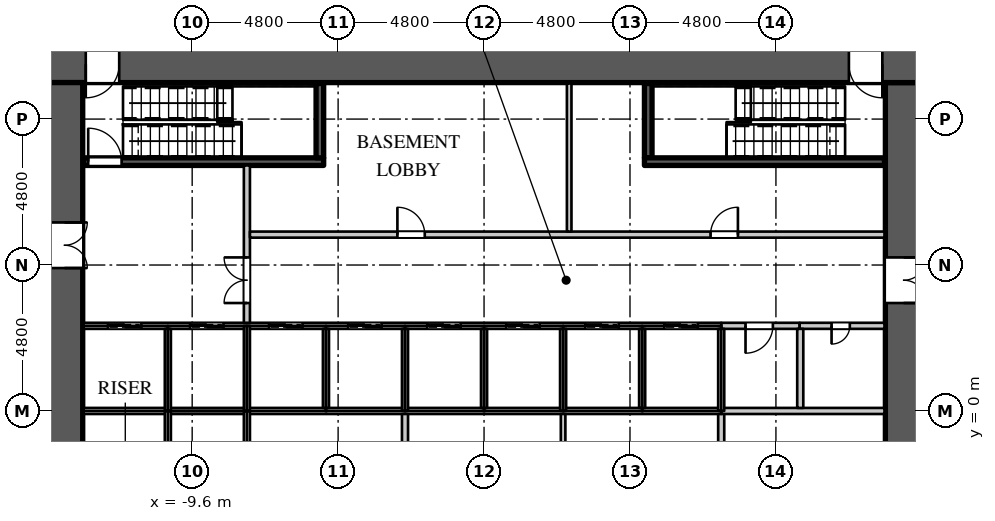
"""IFC4 building model, lengths in metres.
Left out: names, types, materials, properties, quantities, classifications, styles, units other than length and angle.
Written with IfcOpenShell. Run it as: python <this file> out.ifc"""

import sys

from ifc_helpers import new_model, si_unit, direction, frame, frame_2d, origin, place, context, subcontext, project, spatial, rectangle, extrude, element, fill, save


model = new_model("IFC4")
c1 = context("Model", 3, precision=1e-05, world=origin(), true_north=direction((0.0, 1.0)))
c2 = subcontext(c1, "Body", "Model", "MODEL_VIEW")
j1 = project(units=[si_unit("LENGTHUNIT", "METRE"), si_unit("PLANEANGLEUNIT", "RADIAN")], contexts=[c1])
p1 = place(None, origin())
s1 = spatial("IfcSite", under=j1, at=p1, CompositionType="ELEMENT")
p2 = place(p1, origin())
s2 = spatial("IfcBuilding", under=s1, at=p2, CompositionType="ELEMENT")
p3 = place(p2, frame((0.0, 0.0, -4.5)))
s3 = spatial("IfcBuildingStorey", under=s2, at=p3, CompositionType="ELEMENT", Elevation=-4.5)
p4 = place(p3, frame((-14.4, 11.4, 0.0), z_axis=(0.0, 0.0, 1.0), x_axis=(1.0, 0.0, 0.0)))
e1 = element("IfcWall", 1, at=p4, inside=s3, PredefinedType="SHEAR", context=c2, shape_type="SweptSolid", body=[
    extrude(rectangle(XDim=28.8, YDim=1.2, at=frame_2d((14.4, 0.0))), origin(), (0.0, 0.0, 1.0), 4.5),
])
p5 = place(p4, frame((1.3, 0.0, 0.0)))
e2 = element("IfcOpeningElement", 2, at=p5, cuts=e1, PredefinedType="OPENING", context=c2, shape_type="SweptSolid", body=[
    extrude(rectangle(XDim=1.1, YDim=2.2, at=frame_2d((0.55, 1.1))), frame((0.0, 0.61, 0.0), z_axis=(0.0, -1.0, 0.0), x_axis=(1.0, 0.0, 0.0)), (0.0, 0.0, 1.0), 1.22),
])
p6 = place(p4, frame((26.4, 0.0, 0.0)))
e3 = element("IfcOpeningElement", 3, at=p6, cuts=e1, PredefinedType="OPENING", context=c2, shape_type="SweptSolid", body=[
    extrude(rectangle(XDim=1.1, YDim=2.2, at=frame_2d((0.55, 1.1))), frame((0.0, 0.61, 0.0), z_axis=(0.0, -1.0, 0.0), x_axis=(1.0, 0.0, 0.0)), (0.0, 0.0, 1.0), 1.22),
])
p7 = place(p3, frame((13.8, -10.8, 0.0), z_axis=(0.0, 0.0, 1.0), x_axis=(0.0, 1.0, 0.0)))
e4 = element("IfcWall", 4, at=p7, inside=s3, PredefinedType="SHEAR", context=c2, shape_type="SweptSolid", body=[
    extrude(rectangle(XDim=21.6, YDim=1.2, at=frame_2d((10.8, 0.0))), origin(), (0.0, 0.0, 1.0), 4.5),
])
p8 = place(p7, frame((14.35, 0.0, 0.0)))
e5 = element("IfcOpeningElement", 5, at=p8, cuts=e4, PredefinedType="OPENING", context=c2, shape_type="SweptSolid", body=[
    extrude(rectangle(XDim=1.5, YDim=2.4, at=frame_2d((0.75, 1.2))), frame((0.0, 0.61, 0.0), z_axis=(0.0, -1.0, 0.0), x_axis=(1.0, 0.0, 0.0)), (0.0, 0.0, 1.0), 1.22),
])
p9 = place(p3, frame((-13.8, -10.8, 0.0), z_axis=(0.0, 0.0, 1.0), x_axis=(0.0, 1.0, 0.0)))
e6 = element("IfcWall", 6, at=p9, inside=s3, PredefinedType="SHEAR", context=c2, shape_type="SweptSolid", body=[
    extrude(rectangle(XDim=21.6, YDim=1.2, at=frame_2d((10.8, 0.0))), origin(), (0.0, 0.0, 1.0), 4.5),
])
p10 = place(p9, frame((15.5, 0.0, 0.0)))
e7 = element("IfcOpeningElement", 7, at=p10, cuts=e6, PredefinedType="OPENING", context=c2, shape_type="SweptSolid", body=[
    extrude(rectangle(XDim=1.5, YDim=2.4, at=frame_2d((0.75, 1.2))), frame((0.0, 0.61, 0.0), z_axis=(0.0, -1.0, 0.0), x_axis=(1.0, 0.0, 0.0)), (0.0, 0.0, 1.0), 1.22),
])
p11 = place(p9, frame((4.5, 0.0, 0.0)))
e8 = element("IfcOpeningElement", 8, at=p11, cuts=e6, PredefinedType="OPENING", context=c2, shape_type="SweptSolid", body=[
    extrude(rectangle(XDim=1.5, YDim=2.4, at=frame_2d((0.75, 1.2))), frame((0.0, 0.61, 0.0), z_axis=(0.0, -1.0, 0.0), x_axis=(1.0, 0.0, 0.0)), (0.0, 0.0, 1.0), 1.22),
])
p12 = place(p3, frame((-7.8, 2.8, 0.0), z_axis=(0.0, 0.0, 1.0), x_axis=(0.0, 1.0, 0.0)))
e9 = element("IfcWall", 9, at=p12, inside=s3, PredefinedType="PARTITIONING", context=c2, shape_type="SweptSolid", body=[
    extrude(rectangle(XDim=5.275, YDim=0.2, at=frame_2d((2.637, 0.0))), origin(), (0.0, 0.0, 1.0), 4.048),
])
p13 = place(p12, frame((0.75, 0.0, 0.0)))
e10 = element("IfcOpeningElement", 10, at=p13, cuts=e9, PredefinedType="OPENING", context=c2, shape_type="SweptSolid", body=[
    extrude(rectangle(XDim=1.5, YDim=2.4, at=frame_2d((0.75, 1.2))), frame((0.0, 0.11, 0.0), z_axis=(0.0, -1.0, 0.0), x_axis=(1.0, 0.0, 0.0)), (0.0, 0.0, 1.0), 0.22),
])
p14 = place(p3, frame((-7.7, 5.8, 0.0), z_axis=(0.0, 0.0, 1.0), x_axis=(1.0, 0.0, 0.0)))
e11 = element("IfcWall", 11, at=p14, inside=s3, PredefinedType="PARTITIONING", context=c2, shape_type="SweptSolid", body=[
    extrude(rectangle(XDim=20.87, YDim=0.2, at=frame_2d((10.435, 0.0))), origin(), (0.0, 0.0, 1.0), 4.048),
])
p15 = place(p14, frame((4.85, 0.0, 0.0)))
e12 = element("IfcOpeningElement", 12, at=p15, cuts=e11, PredefinedType="OPENING", context=c2, shape_type="SweptSolid", body=[
    extrude(rectangle(XDim=0.9, YDim=2.2, at=frame_2d((0.45, 1.1))), frame((0.0, 0.11, 0.0), z_axis=(0.0, -1.0, 0.0), x_axis=(1.0, 0.0, 0.0)), (0.0, 0.0, 1.0), 0.22),
])
p16 = place(p14, frame((15.15, 0.0, 0.0)))
e13 = element("IfcOpeningElement", 13, at=p16, cuts=e11, PredefinedType="OPENING", context=c2, shape_type="SweptSolid", body=[
    extrude(rectangle(XDim=0.9, YDim=2.2, at=frame_2d((0.45, 1.1))), frame((0.0, 0.11, 0.0), z_axis=(0.0, -1.0, 0.0), x_axis=(1.0, 0.0, 0.0)), (0.0, 0.0, 1.0), 0.22),
])
p17 = place(p3, frame((7.8, 2.8, 0.0), z_axis=(0.0, 0.0, 1.0), x_axis=(1.0, 0.0, 0.0)))
e14 = element("IfcWall", 14, at=p17, inside=s3, PredefinedType="PARTITIONING", context=c2, shape_type="SweptSolid", body=[
    extrude(rectangle(XDim=2.58, YDim=0.2, at=frame_2d((1.29, 0.0))), origin(), (0.0, 0.0, 1.0), 4.048),
])
p18 = place(p17, frame((0.8, 0.0, 0.0)))
e15 = element("IfcOpeningElement", 15, at=p18, cuts=e14, PredefinedType="OPENING", context=c2, shape_type="SweptSolid", body=[
    extrude(rectangle(XDim=0.9, YDim=2.2, at=frame_2d((0.45, 1.1))), frame((0.0, 0.11, 0.0), z_axis=(0.0, -1.0, 0.0), x_axis=(1.0, 0.0, 0.0)), (0.0, 0.0, 1.0), 0.22),
])
p19 = place(p3, frame((2.6, -2.7, 0.0), z_axis=(0.0, 0.0, 1.0), x_axis=(0.0, 1.0, 0.0)))
e16 = element("IfcWall", 16, at=p19, inside=s3, PredefinedType="PARTITIONING", context=c2, shape_type="SweptSolid", body=[
    extrude(rectangle(XDim=2.7, YDim=0.15, at=frame_2d((1.35, 0.0))), origin(), (0.0, 0.0, 1.0), 4.048),
])
p20 = place(p3, frame((2.8, 5.9, 0.0), z_axis=(0.0, 0.0, 1.0), x_axis=(0.0, 1.0, 0.0)))
e17 = element("IfcWall", 17, at=p20, inside=s3, PredefinedType="PARTITIONING", context=c2, shape_type="SweptSolid", body=[
    extrude(rectangle(XDim=4.87, YDim=0.15, at=frame_2d((2.435, 0.0))), origin(), (0.0, 0.0, 1.0), 4.048),
])
for number, where, z_axis, x_axis in (
    (18, (-2.6, -2.7, 0.0), (0.0, 0.0, 1.0), (0.0, 1.0, 0.0)),
    (19, (7.8, -2.7, 0.0), (0.0, 0.0, 1.0), (0.0, 1.0, 0.0)),
):
    element("IfcWall", number, at=place(p3, frame(where, z_axis=z_axis, x_axis=x_axis)), inside=s3, PredefinedType="PARTITIONING", context=c2, shape_type="SweptSolid", body=[
        extrude(rectangle(XDim=2.7, YDim=0.2, at=frame_2d((1.35, 0.0))), origin(), (0.0, 0.0, 1.0), 4.048),
    ])
p21 = place(p3, frame((7.8, 0.0, 0.0), z_axis=(0.0, 0.0, 1.0), x_axis=(1.0, 0.0, 0.0)))
e20 = element("IfcWall", 20, at=p21, inside=s3, PredefinedType="PARTITIONING", context=c2, shape_type="SweptSolid", body=[
    extrude(rectangle(XDim=5.37, YDim=0.2, at=frame_2d((2.685, 0.0))), origin(), (0.0, 0.0, 1.0), 4.048),
])
p22 = place(p3, frame((10.38, 2.8, 0.0), z_axis=(0.0, 0.0, 1.0), x_axis=(1.0, 0.0, 0.0)))
e21 = element("IfcWall", 21, at=p22, inside=s3, PredefinedType="PARTITIONING", context=c2, shape_type="SweptSolid", body=[
    extrude(rectangle(XDim=2.79, YDim=0.2, at=frame_2d((1.395, 0.0))), origin(), (0.0, 0.0, 1.0), 4.048),
])
p23 = place(p22, frame((1.05, 0.0, 0.0)))
e22 = element("IfcOpeningElement", 22, at=p23, cuts=e21, PredefinedType="OPENING", context=c2, shape_type="SweptSolid", body=[
    extrude(rectangle(XDim=0.6, YDim=2.0, at=frame_2d((0.3, 1.0))), frame((0.0, 0.11, 0.0), z_axis=(0.0, -1.0, 0.0), x_axis=(1.0, 0.0, 0.0)), (0.0, 0.0, 1.0), 0.22),
])
p24 = place(p3, frame((10.4, 0.1, 0.0), z_axis=(0.0, 0.0, 1.0), x_axis=(0.0, 1.0, 0.0)))
e23 = element("IfcWall", 23, at=p24, inside=s3, PredefinedType="PARTITIONING", context=c2, shape_type="SweptSolid", body=[
    extrude(rectangle(XDim=2.6, YDim=0.2, at=frame_2d((1.3, 0.0))), origin(), (0.0, 0.0, 1.0), 4.048),
])
p25 = place(p3, frame((-13.17, 0.0, 0.0), z_axis=(0.0, 0.0, 1.0), x_axis=(1.0, 0.0, 0.0)))
e24 = element("IfcWall", 24, at=p25, inside=s3, PredefinedType="PARTITIONING", context=c2, shape_type="SweptSolid", body=[
    extrude(rectangle(XDim=20.97, YDim=0.2, at=frame_2d((10.485, 0.0))), origin(), (0.0, 0.0, 1.0), 4.048),
])
p26 = place(p3, frame((-13.17, 2.8, 0.0), z_axis=(0.0, 0.0, 1.0), x_axis=(1.0, 0.0, 0.0)))
e25 = element("IfcWall", 25, at=p26, inside=s3, PredefinedType="PARTITIONING", context=c2, shape_type="SweptSolid", body=[
    extrude(rectangle(XDim=20.97, YDim=0.2, at=frame_2d((10.485, 0.0))), origin(), (0.0, 0.0, 1.0), 4.048),
])
p27 = place(p26, frame((0.8, 0.0, 0.0)))
e26 = element("IfcOpeningElement", 26, at=p27, cuts=e25, PredefinedType="OPENING", context=c2, shape_type="SweptSolid", body=[
    extrude(rectangle(XDim=1.1, YDim=2.2, at=frame_2d((0.55, 1.1))), frame((0.0, 0.11, 0.0), z_axis=(0.0, -1.0, 0.0), x_axis=(1.0, 0.0, 0.0)), (0.0, 0.0, 1.0), 0.22),
])
p28 = place(p26, frame((3.5, 0.0, 0.0)))
e27 = element("IfcOpeningElement", 27, at=p28, cuts=e25, PredefinedType="OPENING", context=c2, shape_type="SweptSolid", body=[
    extrude(rectangle(XDim=1.1, YDim=2.2, at=frame_2d((0.55, 1.1))), frame((0.0, 0.11, 0.0), z_axis=(0.0, -1.0, 0.0), x_axis=(1.0, 0.0, 0.0)), (0.0, 0.0, 1.0), 0.22),
])
p29 = place(p26, frame((6.1, 0.0, 0.0)))
e28 = element("IfcOpeningElement", 28, at=p29, cuts=e25, PredefinedType="OPENING", context=c2, shape_type="SweptSolid", body=[
    extrude(rectangle(XDim=1.1, YDim=2.2, at=frame_2d((0.55, 1.1))), frame((0.0, 0.11, 0.0), z_axis=(0.0, -1.0, 0.0), x_axis=(1.0, 0.0, 0.0)), (0.0, 0.0, 1.0), 0.22),
])
p30 = place(p26, frame((8.7, 0.0, 0.0)))
e29 = element("IfcOpeningElement", 29, at=p30, cuts=e25, PredefinedType="OPENING", context=c2, shape_type="SweptSolid", body=[
    extrude(rectangle(XDim=1.1, YDim=2.2, at=frame_2d((0.55, 1.1))), frame((0.0, 0.11, 0.0), z_axis=(0.0, -1.0, 0.0), x_axis=(1.0, 0.0, 0.0)), (0.0, 0.0, 1.0), 0.22),
])
p31 = place(p26, frame((11.3, 0.0, 0.0)))
e30 = element("IfcOpeningElement", 30, at=p31, cuts=e25, PredefinedType="OPENING", context=c2, shape_type="SweptSolid", body=[
    extrude(rectangle(XDim=1.1, YDim=2.2, at=frame_2d((0.55, 1.1))), frame((0.0, 0.11, 0.0), z_axis=(0.0, -1.0, 0.0), x_axis=(1.0, 0.0, 0.0)), (0.0, 0.0, 1.0), 0.22),
])
p32 = place(p26, frame((13.9, 0.0, 0.0)))
e31 = element("IfcOpeningElement", 31, at=p32, cuts=e25, PredefinedType="OPENING", context=c2, shape_type="SweptSolid", body=[
    extrude(rectangle(XDim=1.1, YDim=2.2, at=frame_2d((0.55, 1.1))), frame((0.0, 0.11, 0.0), z_axis=(0.0, -1.0, 0.0), x_axis=(1.0, 0.0, 0.0)), (0.0, 0.0, 1.0), 0.22),
])
p33 = place(p26, frame((16.5, 0.0, 0.0)))
e32 = element("IfcOpeningElement", 32, at=p33, cuts=e25, PredefinedType="OPENING", context=c2, shape_type="SweptSolid", body=[
    extrude(rectangle(XDim=1.1, YDim=2.2, at=frame_2d((0.55, 1.1))), frame((0.0, 0.11, 0.0), z_axis=(0.0, -1.0, 0.0), x_axis=(1.0, 0.0, 0.0)), (0.0, 0.0, 1.0), 0.22),
])
p34 = place(p26, frame((19.1, 0.0, 0.0)))
e33 = element("IfcOpeningElement", 33, at=p34, cuts=e25, PredefinedType="OPENING", context=c2, shape_type="SweptSolid", body=[
    extrude(rectangle(XDim=1.1, YDim=2.2, at=frame_2d((0.55, 1.1))), frame((0.0, 0.11, 0.0), z_axis=(0.0, -1.0, 0.0), x_axis=(1.0, 0.0, 0.0)), (0.0, 0.0, 1.0), 0.22),
])
for number, where, z_axis, x_axis in (
    (34, (-10.4, -2.7, 0.0), (0.0, 0.0, 1.0), (0.0, 1.0, 0.0)),
    (35, (-10.4, 0.0, 0.0), (0.0, 0.0, 1.0), (0.0, 1.0, 0.0)),
):
    element("IfcWall", number, at=place(p3, frame(where, z_axis=z_axis, x_axis=x_axis)), inside=s3, PredefinedType="PARTITIONING", context=c2, shape_type="SweptSolid", body=[
        extrude(rectangle(XDim=2.7, YDim=0.2, at=frame_2d((1.35, 0.0))), origin(), (0.0, 0.0, 1.0), 4.048),
    ])
for number, where, z_axis, x_axis in (
    (36, (-7.8, -2.8, 0.0), (0.0, 0.0, 1.0), (0.0, 1.0, 0.0)),
    (37, (-7.8, 0.0, 0.0), (0.0, 0.0, 1.0), (0.0, 1.0, 0.0)),
):
    element("IfcWall", number, at=place(p3, frame(where, z_axis=z_axis, x_axis=x_axis)), inside=s3, PredefinedType="PARTITIONING", context=c2, shape_type="SweptSolid", body=[
        extrude(rectangle(XDim=2.8, YDim=0.2, at=frame_2d((1.4, 0.0))), origin(), (0.0, 0.0, 1.0), 4.048),
    ])
p35 = place(p3, frame((-5.2, 0.1, 0.0), z_axis=(0.0, 0.0, 1.0), x_axis=(0.0, 1.0, 0.0)))
e38 = element("IfcWall", 38, at=p35, inside=s3, PredefinedType="PARTITIONING", context=c2, shape_type="SweptSolid", body=[
    extrude(rectangle(XDim=2.6, YDim=0.2, at=frame_2d((1.3, 0.0))), origin(), (0.0, 0.0, 1.0), 4.048),
])
p36 = place(p3, frame((-2.6, 0.0, 0.0), z_axis=(0.0, 0.0, 1.0), x_axis=(0.0, 1.0, 0.0)))
e39 = element("IfcWall", 39, at=p36, inside=s3, PredefinedType="PARTITIONING", context=c2, shape_type="SweptSolid", body=[
    extrude(rectangle(XDim=2.7, YDim=0.2, at=frame_2d((1.35, 0.0))), origin(), (0.0, 0.0, 1.0), 4.048),
])
p37 = place(p3, frame((0.0, 0.1, 0.0), z_axis=(0.0, 0.0, 1.0), x_axis=(0.0, 1.0, 0.0)))
e40 = element("IfcWall", 40, at=p37, inside=s3, PredefinedType="PARTITIONING", context=c2, shape_type="SweptSolid", body=[
    extrude(rectangle(XDim=2.6, YDim=0.2, at=frame_2d((1.3, 0.0))), origin(), (0.0, 0.0, 1.0), 4.048),
])
p38 = place(p3, frame((2.6, 0.0, 0.0), z_axis=(0.0, 0.0, 1.0), x_axis=(0.0, 1.0, 0.0)))
e41 = element("IfcWall", 41, at=p38, inside=s3, PredefinedType="PARTITIONING", context=c2, shape_type="SweptSolid", body=[
    extrude(rectangle(XDim=2.7, YDim=0.2, at=frame_2d((1.35, 0.0))), origin(), (0.0, 0.0, 1.0), 4.048),
])
p39 = place(p3, frame((5.2, 0.1, 0.0), z_axis=(0.0, 0.0, 1.0), x_axis=(0.0, 1.0, 0.0)))
e42 = element("IfcWall", 42, at=p39, inside=s3, PredefinedType="PARTITIONING", context=c2, shape_type="SweptSolid", body=[
    extrude(rectangle(XDim=2.6, YDim=0.2, at=frame_2d((1.3, 0.0))), origin(), (0.0, 0.0, 1.0), 4.048),
])
p40 = place(p3, frame((7.8, 0.0, 0.0), z_axis=(0.0, 0.0, 1.0), x_axis=(0.0, 1.0, 0.0)))
e43 = element("IfcWall", 43, at=p40, inside=s3, PredefinedType="PARTITIONING", context=c2, shape_type="SweptSolid", body=[
    extrude(rectangle(XDim=2.7, YDim=0.2, at=frame_2d((1.35, 0.0))), origin(), (0.0, 0.0, 1.0), 4.048),
])
p41 = place(p3, frame((-13.17, 8.2, 0.0), z_axis=(0.0, 0.0, 1.0), x_axis=(1.0, 0.0, 0.0)))
e44 = element("IfcWall", 44, at=p41, inside=s3, PredefinedType="SHEAR", context=c2, shape_type="SweptSolid", body=[
    extrude(rectangle(XDim=7.895, YDim=0.25, at=frame_2d((3.948, 0.0))), origin(), (0.0, 0.0, 1.0), 4.048),
])
p42 = place(p41, frame((0.15, 0.0, 0.0)))
e45 = element("IfcOpeningElement", 45, at=p42, cuts=e44, PredefinedType="OPENING", context=c2, shape_type="SweptSolid", body=[
    extrude(rectangle(XDim=1.1, YDim=2.2, at=frame_2d((0.55, 1.1))), frame((0.0, 0.135, 0.0), z_axis=(0.0, -1.0, 0.0), x_axis=(1.0, 0.0, 0.0)), (0.0, 0.0, 1.0), 0.27),
])
for number, where, z_axis, x_axis in (
    (46, (-5.4, 8.325, 0.0), (0.0, 0.0, 1.0), (0.0, 1.0, 0.0)),
    (47, (5.4, 8.325, 0.0), (0.0, 0.0, 1.0), (0.0, 1.0, 0.0)),
):
    element("IfcWall", number, at=place(p3, frame(where, z_axis=z_axis, x_axis=x_axis)), inside=s3, PredefinedType="SHEAR", context=c2, shape_type="SweptSolid", body=[
        extrude(rectangle(XDim=2.445, YDim=0.25, at=frame_2d((1.223, 0.0))), origin(), (0.0, 0.0, 1.0), 4.048),
    ])
p43 = place(p3, frame((5.275, 8.2, 0.0), z_axis=(0.0, 0.0, 1.0), x_axis=(1.0, 0.0, 0.0)))
e48 = element("IfcWall", 48, at=p43, inside=s3, PredefinedType="SHEAR", context=c2, shape_type="SweptSolid", body=[
    extrude(rectangle(XDim=7.895, YDim=0.25, at=frame_2d((3.948, 0.0))), origin(), (0.0, 0.0, 1.0), 4.048),
])
p44 = place(p23, origin())
e49 = element("IfcDoor", 49, at=p44, inside=s3, OperationType="SINGLE_SWING_RIGHT", PredefinedType="DOOR", context=c2, shape_type="SweptSolid", body=[
    extrude(rectangle(XDim=0.6, YDim=2.0, at=frame_2d((0.3, 1.0))), frame((0.0, 0.025, 0.0), z_axis=(0.0, -1.0, 0.0), x_axis=(1.0, 0.0, 0.0)), (0.0, 0.0, 1.0), 0.05),
])
fill(e22, e49)
p45 = place(p15, origin())
e50 = element("IfcDoor", 50, at=p45, inside=s3, OperationType="SINGLE_SWING_LEFT", PredefinedType="DOOR", context=c2, shape_type="SweptSolid", body=[
    extrude(rectangle(XDim=0.9, YDim=2.2, at=frame_2d((0.45, 1.1))), frame((0.0, 0.025, 0.0), z_axis=(0.0, -1.0, 0.0), x_axis=(1.0, 0.0, 0.0)), (0.0, 0.0, 1.0), 0.05),
])
fill(e12, e50)
p46 = place(p16, origin())
e51 = element("IfcDoor", 51, at=p46, inside=s3, OperationType="SINGLE_SWING_RIGHT", PredefinedType="DOOR", context=c2, shape_type="SweptSolid", body=[
    extrude(rectangle(XDim=0.9, YDim=2.2, at=frame_2d((0.45, 1.1))), frame((0.0, 0.025, 0.0), z_axis=(0.0, -1.0, 0.0), x_axis=(1.0, 0.0, 0.0)), (0.0, 0.0, 1.0), 0.05),
])
fill(e13, e51)
p47 = place(p18, origin())
e52 = element("IfcDoor", 52, at=p47, inside=s3, OperationType="SINGLE_SWING_RIGHT", PredefinedType="DOOR", context=c2, shape_type="SweptSolid", body=[
    extrude(rectangle(XDim=0.9, YDim=2.2, at=frame_2d((0.45, 1.1))), frame((0.0, 0.025, 0.0), z_axis=(0.0, -1.0, 0.0), x_axis=(1.0, 0.0, 0.0)), (0.0, 0.0, 1.0), 0.05),
])
fill(e15, e52)
p48 = place(p27, origin())
e53 = element("IfcDoor", 53, at=p48, inside=s3, OperationType="DOUBLE_DOOR_SLIDING", PredefinedType="DOOR", context=c2, shape_type="SweptSolid", body=[
    extrude(rectangle(XDim=1.1, YDim=2.2, at=frame_2d((0.55, 1.1))), frame((0.0, 0.025, 0.0), z_axis=(0.0, -1.0, 0.0), x_axis=(1.0, 0.0, 0.0)), (0.0, 0.0, 1.0), 0.05),
])
fill(e26, e53)
p49 = place(p28, origin())
e54 = element("IfcDoor", 54, at=p49, inside=s3, OperationType="DOUBLE_DOOR_SLIDING", PredefinedType="DOOR", context=c2, shape_type="SweptSolid", body=[
    extrude(rectangle(XDim=1.1, YDim=2.2, at=frame_2d((0.55, 1.1))), frame((0.0, 0.025, 0.0), z_axis=(0.0, -1.0, 0.0), x_axis=(1.0, 0.0, 0.0)), (0.0, 0.0, 1.0), 0.05),
])
fill(e27, e54)
p50 = place(p29, origin())
e55 = element("IfcDoor", 55, at=p50, inside=s3, OperationType="DOUBLE_DOOR_SLIDING", PredefinedType="DOOR", context=c2, shape_type="SweptSolid", body=[
    extrude(rectangle(XDim=1.1, YDim=2.2, at=frame_2d((0.55, 1.1))), frame((0.0, 0.025, 0.0), z_axis=(0.0, -1.0, 0.0), x_axis=(1.0, 0.0, 0.0)), (0.0, 0.0, 1.0), 0.05),
])
fill(e28, e55)
p51 = place(p30, origin())
e56 = element("IfcDoor", 56, at=p51, inside=s3, OperationType="DOUBLE_DOOR_SLIDING", PredefinedType="DOOR", context=c2, shape_type="SweptSolid", body=[
    extrude(rectangle(XDim=1.1, YDim=2.2, at=frame_2d((0.55, 1.1))), frame((0.0, 0.025, 0.0), z_axis=(0.0, -1.0, 0.0), x_axis=(1.0, 0.0, 0.0)), (0.0, 0.0, 1.0), 0.05),
])
fill(e29, e56)
p52 = place(p31, origin())
e57 = element("IfcDoor", 57, at=p52, inside=s3, OperationType="DOUBLE_DOOR_SLIDING", PredefinedType="DOOR", context=c2, shape_type="SweptSolid", body=[
    extrude(rectangle(XDim=1.1, YDim=2.2, at=frame_2d((0.55, 1.1))), frame((0.0, 0.025, 0.0), z_axis=(0.0, -1.0, 0.0), x_axis=(1.0, 0.0, 0.0)), (0.0, 0.0, 1.0), 0.05),
])
fill(e30, e57)
p53 = place(p32, origin())
e58 = element("IfcDoor", 58, at=p53, inside=s3, OperationType="DOUBLE_DOOR_SLIDING", PredefinedType="DOOR", context=c2, shape_type="SweptSolid", body=[
    extrude(rectangle(XDim=1.1, YDim=2.2, at=frame_2d((0.55, 1.1))), frame((0.0, 0.025, 0.0), z_axis=(0.0, -1.0, 0.0), x_axis=(1.0, 0.0, 0.0)), (0.0, 0.0, 1.0), 0.05),
])
fill(e31, e58)
p54 = place(p33, origin())
e59 = element("IfcDoor", 59, at=p54, inside=s3, OperationType="DOUBLE_DOOR_SLIDING", PredefinedType="DOOR", context=c2, shape_type="SweptSolid", body=[
    extrude(rectangle(XDim=1.1, YDim=2.2, at=frame_2d((0.55, 1.1))), frame((0.0, 0.025, 0.0), z_axis=(0.0, -1.0, 0.0), x_axis=(1.0, 0.0, 0.0)), (0.0, 0.0, 1.0), 0.05),
])
fill(e32, e59)
p55 = place(p34, origin())
e60 = element("IfcDoor", 60, at=p55, inside=s3, OperationType="DOUBLE_DOOR_SLIDING", PredefinedType="DOOR", context=c2, shape_type="SweptSolid", body=[
    extrude(rectangle(XDim=1.1, YDim=2.2, at=frame_2d((0.55, 1.1))), frame((0.0, 0.025, 0.0), z_axis=(0.0, -1.0, 0.0), x_axis=(1.0, 0.0, 0.0)), (0.0, 0.0, 1.0), 0.05),
])
fill(e33, e60)
p56 = place(p42, origin())
e61 = element("IfcDoor", 61, at=p56, inside=s3, OperationType="SINGLE_SWING_LEFT", PredefinedType="DOOR", context=c2, shape_type="SweptSolid", body=[
    extrude(rectangle(XDim=1.1, YDim=2.2, at=frame_2d((0.55, 1.1))), frame((0.0, 0.025, 0.0), z_axis=(0.0, -1.0, 0.0), x_axis=(1.0, 0.0, 0.0)), (0.0, 0.0, 1.0), 0.05),
])
fill(e45, e61)
p57 = place(p13, origin())
e62 = element("IfcDoor", 62, at=p57, inside=s3, OperationType="DOUBLE_DOOR_SINGLE_SWING", PredefinedType="DOOR", context=c2, shape_type="SweptSolid", body=[
    extrude(rectangle(XDim=1.5, YDim=2.4, at=frame_2d((0.75, 1.2))), frame((0.0, 0.025, 0.0), z_axis=(0.0, -1.0, 0.0), x_axis=(1.0, 0.0, 0.0)), (0.0, 0.0, 1.0), 0.05),
])
fill(e10, e62)
p58 = place(p8, origin())
e63 = element("IfcDoor", 63, at=p58, inside=s3, OperationType="DOUBLE_DOOR_SINGLE_SWING", PredefinedType="DOOR", context=c2, shape_type="SweptSolid", body=[
    extrude(rectangle(XDim=1.5, YDim=2.4, at=frame_2d((0.75, 1.2))), frame((0.0, 0.025, 0.0), z_axis=(0.0, -1.0, 0.0), x_axis=(1.0, 0.0, 0.0)), (0.0, 0.0, 1.0), 0.05),
])
fill(e5, e63)
p59 = place(p10, origin())
e64 = element("IfcDoor", 64, at=p59, inside=s3, OperationType="DOUBLE_DOOR_SINGLE_SWING", PredefinedType="DOOR", context=c2, shape_type="SweptSolid", body=[
    extrude(rectangle(XDim=1.5, YDim=2.4, at=frame_2d((0.75, 1.2))), frame((0.0, 0.025, 0.0), z_axis=(0.0, -1.0, 0.0), x_axis=(1.0, 0.0, 0.0)), (0.0, 0.0, 1.0), 0.05),
])
fill(e7, e64)
p60 = place(p5, origin())
e65 = element("IfcDoor", 65, at=p60, inside=s3, OperationType="SINGLE_SWING_RIGHT", PredefinedType="DOOR", context=c2, shape_type="SweptSolid", body=[
    extrude(rectangle(XDim=1.1, YDim=2.2, at=frame_2d((0.55, 1.1))), frame((0.0, 0.025, 0.0), z_axis=(0.0, -1.0, 0.0), x_axis=(1.0, 0.0, 0.0)), (0.0, 0.0, 1.0), 0.05),
])
fill(e2, e65)
p61 = place(p6, origin())
e66 = element("IfcDoor", 66, at=p61, inside=s3, OperationType="SINGLE_SWING_LEFT", PredefinedType="DOOR", context=c2, shape_type="SweptSolid", body=[
    extrude(rectangle(XDim=1.1, YDim=2.2, at=frame_2d((0.55, 1.1))), frame((0.0, 0.025, 0.0), z_axis=(0.0, -1.0, 0.0), x_axis=(1.0, 0.0, 0.0)), (0.0, 0.0, 1.0), 0.05),
])
fill(e3, e66)
save(model, sys.argv[1])
